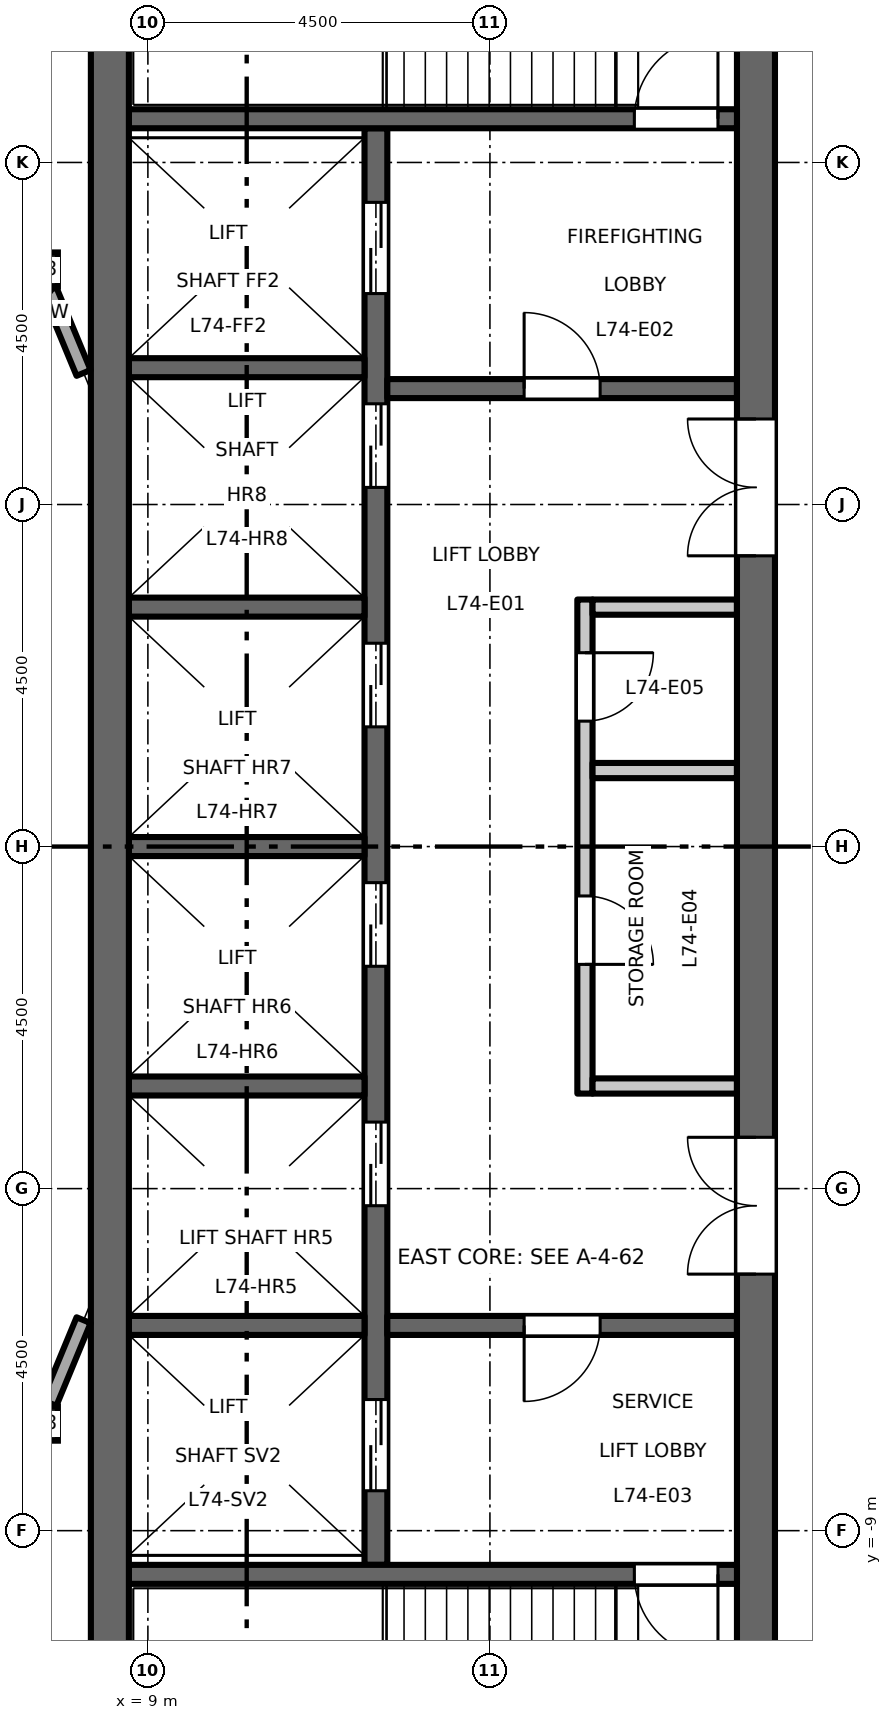
"""IFC4 building model, lengths in metres.
Left out: names, types, materials, properties, quantities, classifications, styles, units other than length and angle.
Written with IfcOpenShell. Run it as: python <this file> out.ifc"""

import sys

from ifc_helpers import new_model, si_unit, direction, frame, frame_2d, origin, origin_2d, place, context, subcontext, project, spatial, rectangle, hollow_rectangle, extrude, element, fill, save


model = new_model("IFC4")
c1 = context("Model", 3, precision=1e-05, world=origin(), true_north=direction((0.0, 1.0)))
c2 = subcontext(c1, "Body", "Model", "MODEL_VIEW")
j1 = project(units=[si_unit("LENGTHUNIT", "METRE"), si_unit("PLANEANGLEUNIT", "RADIAN")], contexts=[c1])
p1 = place(None, origin())
s1 = spatial("IfcSite", under=j1, at=p1, CompositionType="ELEMENT")
p2 = place(p1, origin())
s2 = spatial("IfcBuilding", under=s1, at=p2, CompositionType="ELEMENT")
p3 = place(p2, frame((0.0, 0.0, 343.7)))
s3 = spatial("IfcBuildingStorey", under=s2, at=p3, CompositionType="ELEMENT", Elevation=343.7)
for number, where, z_axis, x_axis in (
    (1, (7.591, -7.591, 0.0), (0.0, 0.0, 1.0), (1.0, 0.0, 0.0)),
    (2, (7.591, 7.591, 0.0), (0.0, 0.0, 1.0), (1.0, 0.0, 0.0)),
):
    element("IfcColumn", number, at=place(p3, frame(where, z_axis=z_axis, x_axis=x_axis)), inside=s3, PredefinedType="COLUMN", context=c2, shape_type="SweptSolid", body=[
        extrude(hollow_rectangle(XDim=0.45, YDim=0.45, WallThickness=0.022, at=origin_2d()), origin(), (0.0, 0.0, 1.0), 4.5),
    ])
p4 = place(p3, frame((14.75, -3.25, 0.0), z_axis=(0.0, 0.0, 1.0), x_axis=(0.0, 1.0, 0.0)))
e3 = element("IfcWall", 3, at=p4, inside=s3, PredefinedType="PARTITIONING", context=c2, shape_type="SweptSolid", body=[
    extrude(rectangle(XDim=6.5, YDim=0.2, at=frame_2d((3.25, 0.0))), origin(), (0.0, 0.0, 1.0), 4.3),
])
p5 = place(p4, frame((1.7, 0.0, 0.0)))
e4 = element("IfcOpeningElement", 4, at=p5, cuts=e3, PredefinedType="OPENING", context=c2, shape_type="SweptSolid", body=[
    extrude(rectangle(XDim=0.9, YDim=2.1, at=frame_2d((0.45, 1.05))), frame((0.0, 0.11, 0.0), z_axis=(0.0, -1.0, 0.0), x_axis=(1.0, 0.0, 0.0)), (0.0, 0.0, 1.0), 0.22),
])
p6 = place(p4, frame((4.9, 0.0, 0.0)))
e5 = element("IfcOpeningElement", 5, at=p6, cuts=e3, PredefinedType="OPENING", context=c2, shape_type="SweptSolid", body=[
    extrude(rectangle(XDim=0.9, YDim=2.1, at=frame_2d((0.45, 1.05))), frame((0.0, 0.11, 0.0), z_axis=(0.0, -1.0, 0.0), x_axis=(1.0, 0.0, 0.0)), (0.0, 0.0, 1.0), 0.22),
])
for number, where, z_axis, x_axis in (
    (6, (14.85, 3.15, 0.0), (0.0, 0.0, 1.0), (1.0, 0.0, 0.0)),
    (7, (14.85, -3.15, 0.0), (0.0, 0.0, 1.0), (1.0, 0.0, 0.0)),
    (8, (14.85, 1.0, 0.0), (0.0, 0.0, 1.0), (1.0, 0.0, 0.0)),
):
    element("IfcWall", number, at=place(p3, frame(where, z_axis=z_axis, x_axis=x_axis)), inside=s3, PredefinedType="PARTITIONING", context=c2, shape_type="SweptSolid", body=[
        extrude(rectangle(XDim=1.9, YDim=0.2, at=frame_2d((0.95, 0.0))), origin(), (0.0, 0.0, 1.0), 4.3),
    ])
p7 = place(p3, frame((12.0, -9.45, 0.0), z_axis=(0.0, 0.0, 1.0), x_axis=(0.0, 1.0, 0.0)))
e9 = element("IfcWall", 9, at=p7, inside=s3, PredefinedType="SHEAR", context=c2, shape_type="SweptSolid", body=[
    extrude(rectangle(XDim=18.9, YDim=0.3, at=frame_2d((9.45, 0.0))), origin(), (0.0, 0.0, 1.0), 4.3),
])
p8 = place(p7, frame((4.725, 0.0, 0.0)))
e10 = element("IfcOpeningElement", 10, at=p8, cuts=e9, PredefinedType="OPENING", context=c2, shape_type="SweptSolid", body=[
    extrude(rectangle(XDim=1.1, YDim=2.1, at=frame_2d((0.55, 1.05))), frame((0.0, 0.16, 0.0), z_axis=(0.0, -1.0, 0.0), x_axis=(1.0, 0.0, 0.0)), (0.0, 0.0, 1.0), 0.32),
])
p9 = place(p7, frame((7.875, 0.0, 0.0)))
e11 = element("IfcOpeningElement", 11, at=p9, cuts=e9, PredefinedType="OPENING", context=c2, shape_type="SweptSolid", body=[
    extrude(rectangle(XDim=1.1, YDim=2.1, at=frame_2d((0.55, 1.05))), frame((0.0, 0.16, 0.0), z_axis=(0.0, -1.0, 0.0), x_axis=(1.0, 0.0, 0.0)), (0.0, 0.0, 1.0), 0.32),
])
p10 = place(p7, frame((11.025, 0.0, 0.0)))
e12 = element("IfcOpeningElement", 12, at=p10, cuts=e9, PredefinedType="OPENING", context=c2, shape_type="SweptSolid", body=[
    extrude(rectangle(XDim=1.1, YDim=2.1, at=frame_2d((0.55, 1.05))), frame((0.0, 0.16, 0.0), z_axis=(0.0, -1.0, 0.0), x_axis=(1.0, 0.0, 0.0)), (0.0, 0.0, 1.0), 0.32),
])
p11 = place(p7, frame((14.175, 0.0, 0.0)))
e13 = element("IfcOpeningElement", 13, at=p11, cuts=e9, PredefinedType="OPENING", context=c2, shape_type="SweptSolid", body=[
    extrude(rectangle(XDim=1.1, YDim=2.1, at=frame_2d((0.55, 1.05))), frame((0.0, 0.16, 0.0), z_axis=(0.0, -1.0, 0.0), x_axis=(1.0, 0.0, 0.0)), (0.0, 0.0, 1.0), 0.32),
])
p12 = place(p7, frame((16.725, 0.0, 0.0)))
e14 = element("IfcOpeningElement", 14, at=p12, cuts=e9, PredefinedType="OPENING", context=c2, shape_type="SweptSolid", body=[
    extrude(rectangle(XDim=1.2, YDim=2.1, at=frame_2d((0.6, 1.05))), frame((0.0, 0.16, 0.0), z_axis=(0.0, -1.0, 0.0), x_axis=(1.0, 0.0, 0.0)), (0.0, 0.0, 1.0), 0.32),
])
p13 = place(p7, frame((0.975, 0.0, 0.0)))
e15 = element("IfcOpeningElement", 15, at=p13, cuts=e9, PredefinedType="OPENING", context=c2, shape_type="SweptSolid", body=[
    extrude(rectangle(XDim=1.2, YDim=2.1, at=frame_2d((0.6, 1.05))), frame((0.0, 0.16, 0.0), z_axis=(0.0, -1.0, 0.0), x_axis=(1.0, 0.0, 0.0)), (0.0, 0.0, 1.0), 0.32),
])
p14 = place(p3, frame((12.15, 6.025, 0.0), z_axis=(0.0, 0.0, 1.0), x_axis=(1.0, 0.0, 0.0)))
e16 = element("IfcWall", 16, at=p14, inside=s3, PredefinedType="SHEAR", context=c2, shape_type="SweptSolid", body=[
    extrude(rectangle(XDim=4.6, YDim=0.25, at=frame_2d((2.3, 0.0))), origin(), (0.0, 0.0, 1.0), 4.3),
])
p15 = place(p14, frame((1.8, 0.0, 0.0)))
e17 = element("IfcOpeningElement", 17, at=p15, cuts=e16, PredefinedType="OPENING", context=c2, shape_type="SweptSolid", body=[
    extrude(rectangle(XDim=1.0, YDim=2.1, at=frame_2d((0.5, 1.05))), frame((0.0, 0.135, 0.0), z_axis=(0.0, -1.0, 0.0), x_axis=(1.0, 0.0, 0.0)), (0.0, 0.0, 1.0), 0.27),
])
p16 = place(p3, frame((12.15, -6.3, 0.0), z_axis=(0.0, 0.0, 1.0), x_axis=(1.0, 0.0, 0.0)))
e18 = element("IfcWall", 18, at=p16, inside=s3, PredefinedType="SHEAR", context=c2, shape_type="SweptSolid", body=[
    extrude(rectangle(XDim=4.6, YDim=0.25, at=frame_2d((2.3, 0.0))), origin(), (0.0, 0.0, 1.0), 4.3),
])
p17 = place(p16, frame((1.8, 0.0, 0.0)))
e19 = element("IfcOpeningElement", 19, at=p17, cuts=e18, PredefinedType="OPENING", context=c2, shape_type="SweptSolid", body=[
    extrude(rectangle(XDim=1.0, YDim=2.1, at=frame_2d((0.5, 1.05))), frame((0.0, 0.135, 0.0), z_axis=(0.0, -1.0, 0.0), x_axis=(1.0, 0.0, 0.0)), (0.0, 0.0, 1.0), 0.27),
])
p18 = place(p3, frame((17.0, -13.0, 0.0), z_axis=(0.0, 0.0, 1.0), x_axis=(0.0, 1.0, 0.0)))
e20 = element("IfcWall", 20, at=p18, inside=s3, PredefinedType="SHEAR", context=c2, shape_type="SweptSolid", body=[
    extrude(rectangle(XDim=26.0, YDim=0.5, at=frame_2d((13.0, 0.0))), origin(), (0.0, 0.0, 1.0), 4.3),
])
p19 = place(p18, frame((16.825, 0.0, 0.0)))
e21 = element("IfcOpeningElement", 21, at=p19, cuts=e20, PredefinedType="OPENING", context=c2, shape_type="SweptSolid", body=[
    extrude(rectangle(XDim=1.8, YDim=2.1, at=frame_2d((0.9, 1.05))), frame((0.0, 0.26, 0.0), z_axis=(0.0, -1.0, 0.0), x_axis=(1.0, 0.0, 0.0)), (0.0, 0.0, 1.0), 0.52),
])
p20 = place(p18, frame((7.375, 0.0, 0.0)))
e22 = element("IfcOpeningElement", 22, at=p20, cuts=e20, PredefinedType="OPENING", context=c2, shape_type="SweptSolid", body=[
    extrude(rectangle(XDim=1.8, YDim=2.1, at=frame_2d((0.9, 1.05))), frame((0.0, 0.26, 0.0), z_axis=(0.0, -1.0, 0.0), x_axis=(1.0, 0.0, 0.0)), (0.0, 0.0, 1.0), 0.52),
])
for number, where, z_axis, x_axis in (
    (23, (8.75, 0.0, 0.0), (0.0, 0.0, 1.0), (1.0, 0.0, 0.0)),
    (24, (8.75, 3.15, 0.0), (0.0, 0.0, 1.0), (1.0, 0.0, 0.0)),
    (25, (8.75, 6.3, 0.0), (0.0, 0.0, 1.0), (1.0, 0.0, 0.0)),
    (26, (8.75, -3.15, 0.0), (0.0, 0.0, 1.0), (1.0, 0.0, 0.0)),
    (27, (8.75, -6.3, 0.0), (0.0, 0.0, 1.0), (1.0, 0.0, 0.0)),
):
    element("IfcWall", number, at=place(p3, frame(where, z_axis=z_axis, x_axis=x_axis)), inside=s3, PredefinedType="SHEAR", context=c2, shape_type="SweptSolid", body=[
        extrude(rectangle(XDim=3.1, YDim=0.25, at=frame_2d((1.55, 0.0))), origin(), (0.0, 0.0, 1.0), 4.3),
    ])
p21 = place(p3, frame((8.75, 9.575, 0.0), z_axis=(0.0, 0.0, 1.0), x_axis=(1.0, 0.0, 0.0)))
e28 = element("IfcWall", 28, at=p21, inside=s3, PredefinedType="SHEAR", context=c2, shape_type="SweptSolid", body=[
    extrude(rectangle(XDim=8.0, YDim=0.25, at=frame_2d((4.0, 0.0))), origin(), (0.0, 0.0, 1.0), 4.3),
])
p22 = place(p21, frame((6.65, 0.0, 0.0)))
e29 = element("IfcOpeningElement", 29, at=p22, cuts=e28, PredefinedType="OPENING", context=c2, shape_type="SweptSolid", body=[
    extrude(rectangle(XDim=1.1, YDim=2.1, at=frame_2d((0.55, 1.05))), frame((0.0, 0.135, 0.0), z_axis=(0.0, -1.0, 0.0), x_axis=(1.0, 0.0, 0.0)), (0.0, 0.0, 1.0), 0.27),
])
p23 = place(p3, frame((8.75, -9.575, 0.0), z_axis=(0.0, 0.0, 1.0), x_axis=(1.0, 0.0, 0.0)))
e30 = element("IfcWall", 30, at=p23, inside=s3, PredefinedType="SHEAR", context=c2, shape_type="SweptSolid", body=[
    extrude(rectangle(XDim=8.0, YDim=0.25, at=frame_2d((4.0, 0.0))), origin(), (0.0, 0.0, 1.0), 4.3),
])
p24 = place(p23, frame((6.65, 0.0, 0.0)))
e31 = element("IfcOpeningElement", 31, at=p24, cuts=e30, PredefinedType="OPENING", context=c2, shape_type="SweptSolid", body=[
    extrude(rectangle(XDim=1.1, YDim=2.1, at=frame_2d((0.55, 1.05))), frame((0.0, 0.135, 0.0), z_axis=(0.0, -1.0, 0.0), x_axis=(1.0, 0.0, 0.0)), (0.0, 0.0, 1.0), 0.27),
])
p25 = place(p3, frame((8.5, -13.0, 0.0), z_axis=(0.0, 0.0, 1.0), x_axis=(0.0, 1.0, 0.0)))
e32 = element("IfcWall", 32, at=p25, inside=s3, PredefinedType="SHEAR", context=c2, shape_type="SweptSolid", body=[
    extrude(rectangle(XDim=26.0, YDim=0.5, at=frame_2d((13.0, 0.0))), origin(), (0.0, 0.0, 1.0), 4.3),
])
for number, where, z_axis, x_axis in (
    (33, (7.703, -7.319, 0.0), (0.0, 0.0, 1.0), (0.383, 0.924, 0.0)),
    (34, (8.154, 6.231, 0.0), (0.0, 0.0, 1.0), (-0.383, 0.924, 0.0)),
):
    element("IfcWall", number, at=place(p3, frame(where, z_axis=z_axis, x_axis=x_axis)), inside=s3, PredefinedType="STANDARD", context=c2, shape_type="SweptSolid", body=[
        extrude(rectangle(XDim=1.178, YDim=0.2, at=frame_2d((0.589, 0.0))), origin(), (0.0, 0.0, 1.0), 3.96),
    ])
p26 = place(p15, origin())
e35 = element("IfcDoor", 35, at=p26, inside=s3, OperationType="SINGLE_SWING_RIGHT", PredefinedType="DOOR", context=c2, shape_type="SweptSolid", body=[
    extrude(rectangle(XDim=1.0, YDim=2.1, at=frame_2d((0.5, 1.05))), frame((0.0, 0.025, 0.0), z_axis=(0.0, -1.0, 0.0), x_axis=(1.0, 0.0, 0.0)), (0.0, 0.0, 1.0), 0.05),
])
fill(e17, e35)
p27 = place(p17, origin())
e36 = element("IfcDoor", 36, at=p27, inside=s3, OperationType="SINGLE_SWING_LEFT", PredefinedType="DOOR", context=c2, shape_type="SweptSolid", body=[
    extrude(rectangle(XDim=1.0, YDim=2.1, at=frame_2d((0.5, 1.05))), frame((0.0, 0.025, 0.0), z_axis=(0.0, -1.0, 0.0), x_axis=(1.0, 0.0, 0.0)), (0.0, 0.0, 1.0), 0.05),
])
fill(e19, e36)
p28 = place(p22, origin())
e37 = element("IfcDoor", 37, at=p28, inside=s3, OperationType="SINGLE_SWING_LEFT", PredefinedType="DOOR", context=c2, shape_type="SweptSolid", body=[
    extrude(rectangle(XDim=1.1, YDim=2.1, at=frame_2d((0.55, 1.05))), frame((0.0, 0.025, 0.0), z_axis=(0.0, -1.0, 0.0), x_axis=(1.0, 0.0, 0.0)), (0.0, 0.0, 1.0), 0.05),
])
fill(e29, e37)
p29 = place(p24, origin())
e38 = element("IfcDoor", 38, at=p29, inside=s3, OperationType="SINGLE_SWING_RIGHT", PredefinedType="DOOR", context=c2, shape_type="SweptSolid", body=[
    extrude(rectangle(XDim=1.1, YDim=2.1, at=frame_2d((0.55, 1.05))), frame((0.0, 0.025, 0.0), z_axis=(0.0, -1.0, 0.0), x_axis=(1.0, 0.0, 0.0)), (0.0, 0.0, 1.0), 0.05),
])
fill(e31, e38)
p30 = place(p19, origin())
e39 = element("IfcDoor", 39, at=p30, inside=s3, OperationType="DOUBLE_DOOR_DOUBLE_SWING", PredefinedType="DOOR", context=c2, shape_type="SweptSolid", body=[
    extrude(rectangle(XDim=1.8, YDim=2.1, at=frame_2d((0.9, 1.05))), frame((0.0, 0.025, 0.0), z_axis=(0.0, -1.0, 0.0), x_axis=(1.0, 0.0, 0.0)), (0.0, 0.0, 1.0), 0.05),
])
fill(e21, e39)
p31 = place(p20, origin())
e40 = element("IfcDoor", 40, at=p31, inside=s3, OperationType="DOUBLE_DOOR_DOUBLE_SWING", PredefinedType="DOOR", context=c2, shape_type="SweptSolid", body=[
    extrude(rectangle(XDim=1.8, YDim=2.1, at=frame_2d((0.9, 1.05))), frame((0.0, 0.025, 0.0), z_axis=(0.0, -1.0, 0.0), x_axis=(1.0, 0.0, 0.0)), (0.0, 0.0, 1.0), 0.05),
])
fill(e22, e40)
p32 = place(p8, origin())
e41 = element("IfcDoor", 41, at=p32, inside=s3, OperationType="DOUBLE_DOOR_SLIDING", PredefinedType="DOOR", context=c2, shape_type="SweptSolid", body=[
    extrude(rectangle(XDim=1.1, YDim=2.1, at=frame_2d((0.55, 1.05))), frame((0.0, 0.025, 0.0), z_axis=(0.0, -1.0, 0.0), x_axis=(1.0, 0.0, 0.0)), (0.0, 0.0, 1.0), 0.05),
])
fill(e10, e41)
p33 = place(p9, origin())
e42 = element("IfcDoor", 42, at=p33, inside=s3, OperationType="DOUBLE_DOOR_SLIDING", PredefinedType="DOOR", context=c2, shape_type="SweptSolid", body=[
    extrude(rectangle(XDim=1.1, YDim=2.1, at=frame_2d((0.55, 1.05))), frame((0.0, 0.025, 0.0), z_axis=(0.0, -1.0, 0.0), x_axis=(1.0, 0.0, 0.0)), (0.0, 0.0, 1.0), 0.05),
])
fill(e11, e42)
p34 = place(p10, origin())
e43 = element("IfcDoor", 43, at=p34, inside=s3, OperationType="DOUBLE_DOOR_SLIDING", PredefinedType="DOOR", context=c2, shape_type="SweptSolid", body=[
    extrude(rectangle(XDim=1.1, YDim=2.1, at=frame_2d((0.55, 1.05))), frame((0.0, 0.025, 0.0), z_axis=(0.0, -1.0, 0.0), x_axis=(1.0, 0.0, 0.0)), (0.0, 0.0, 1.0), 0.05),
])
fill(e12, e43)
p35 = place(p11, origin())
e44 = element("IfcDoor", 44, at=p35, inside=s3, OperationType="DOUBLE_DOOR_SLIDING", PredefinedType="DOOR", context=c2, shape_type="SweptSolid", body=[
    extrude(rectangle(XDim=1.1, YDim=2.1, at=frame_2d((0.55, 1.05))), frame((0.0, 0.025, 0.0), z_axis=(0.0, -1.0, 0.0), x_axis=(1.0, 0.0, 0.0)), (0.0, 0.0, 1.0), 0.05),
])
fill(e13, e44)
p36 = place(p12, origin())
e45 = element("IfcDoor", 45, at=p36, inside=s3, OperationType="DOUBLE_DOOR_SLIDING", PredefinedType="DOOR", context=c2, shape_type="SweptSolid", body=[
    extrude(rectangle(XDim=1.2, YDim=2.1, at=frame_2d((0.6, 1.05))), frame((0.0, 0.025, 0.0), z_axis=(0.0, -1.0, 0.0), x_axis=(1.0, 0.0, 0.0)), (0.0, 0.0, 1.0), 0.05),
])
fill(e14, e45)
p37 = place(p13, origin())
e46 = element("IfcDoor", 46, at=p37, inside=s3, OperationType="DOUBLE_DOOR_SLIDING", PredefinedType="DOOR", context=c2, shape_type="SweptSolid", body=[
    extrude(rectangle(XDim=1.2, YDim=2.1, at=frame_2d((0.6, 1.05))), frame((0.0, 0.025, 0.0), z_axis=(0.0, -1.0, 0.0), x_axis=(1.0, 0.0, 0.0)), (0.0, 0.0, 1.0), 0.05),
])
fill(e15, e46)
p38 = place(p5, origin())
e47 = element("IfcDoor", 47, at=p38, inside=s3, OperationType="SINGLE_SWING_LEFT", PredefinedType="DOOR", context=c2, shape_type="SweptSolid", body=[
    extrude(rectangle(XDim=0.9, YDim=2.1, at=frame_2d((0.45, 1.05))), frame((0.0, 0.025, 0.0), z_axis=(0.0, -1.0, 0.0), x_axis=(1.0, 0.0, 0.0)), (0.0, 0.0, 1.0), 0.05),
])
fill(e4, e47)
p39 = place(p6, origin())
e48 = element("IfcDoor", 48, at=p39, inside=s3, OperationType="SINGLE_SWING_RIGHT", PredefinedType="DOOR", context=c2, shape_type="SweptSolid", body=[
    extrude(rectangle(XDim=0.9, YDim=2.1, at=frame_2d((0.45, 1.05))), frame((0.0, 0.025, 0.0), z_axis=(0.0, -1.0, 0.0), x_axis=(1.0, 0.0, 0.0)), (0.0, 0.0, 1.0), 0.05),
])
fill(e5, e48)
save(model, sys.argv[1])
